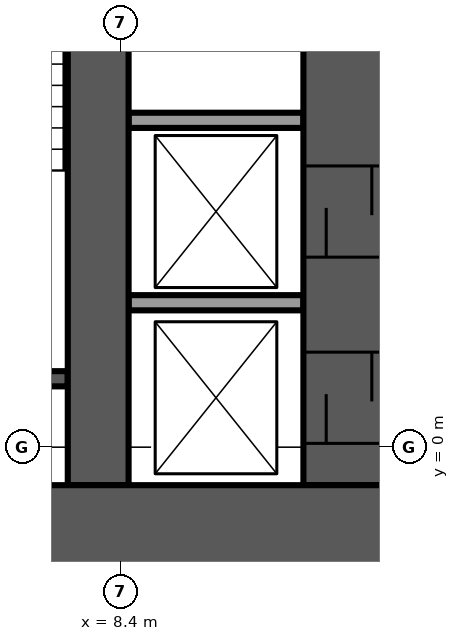
"""IFC4 building model, lengths in metres.
Left out: names, types, materials, properties, quantities, classifications, styles, units other than length and angle.
Written with IfcOpenShell. Run it as: python <this file> out.ifc"""

import sys

from ifc_helpers import new_model, si_unit, direction, frame, frame_2d, origin, place, context, subcontext, project, spatial, rectangle, extrude, element, fill, save


model = new_model("IFC4")
c1 = context("Model", 3, precision=1e-05, world=origin(), true_north=direction((0.0, 1.0)))
c2 = subcontext(c1, "Body", "Model", "MODEL_VIEW")
j1 = project(units=[si_unit("LENGTHUNIT", "METRE"), si_unit("PLANEANGLEUNIT", "RADIAN")], contexts=[c1])
p1 = place(None, origin())
s1 = spatial("IfcSite", under=j1, at=p1, CompositionType="ELEMENT")
p2 = place(p1, origin())
s2 = spatial("IfcBuilding", under=s1, at=p2, CompositionType="ELEMENT")
p3 = place(p2, frame((0.0, 0.0, 14.5)))
s3 = spatial("IfcBuildingStorey", under=s2, at=p3, CompositionType="ELEMENT", Elevation=14.5)
p4 = place(p3, frame((-12.0, -1.1, -0.3), z_axis=(0.0, 0.0, 1.0), x_axis=(1.0, 0.0, 0.0)))
e1 = element("IfcWall", 1, at=p4, inside=s3, PredefinedType="SHEAR", context=c2, shape_type="SweptSolid", body=[
    extrude(rectangle(XDim=24.0, YDim=1.2, at=frame_2d((12.0, 0.0))), origin(), (0.0, 0.0, 1.0), 4.5),
])
p5 = place(p4, frame((11.2, 0.0, 0.0)))
e2 = element("IfcOpeningElement", 2, at=p5, cuts=e1, PredefinedType="OPENING", context=c2, shape_type="SweptSolid", body=[
    extrude(rectangle(XDim=1.6, YDim=2.1, at=frame_2d((0.8, 1.05))), frame((0.0, 0.6, 0.0), z_axis=(0.0, -1.0, 0.0), x_axis=(1.0, 0.0, 0.0)), (0.0, 0.0, 1.0), 1.2),
])
p6 = place(p3, frame((8.1, -0.5, -0.3), z_axis=(0.0, 0.0, 1.0), x_axis=(0.0, 1.0, 0.0)))
e3 = element("IfcWall", 3, at=p6, inside=s3, PredefinedType="SHEAR", context=c2, shape_type="SweptSolid", body=[
    extrude(rectangle(XDim=9.0, YDim=0.8, at=frame_2d((4.5, 0.0))), origin(), (0.0, 0.0, 1.0), 4.5),
])
p7 = place(p6, frame((7.75, 0.0, 0.0)))
e4 = element("IfcOpeningElement", 4, at=p7, cuts=e3, PredefinedType="OPENING", context=c2, shape_type="SweptSolid", body=[
    extrude(rectangle(XDim=1.1, YDim=2.1, at=frame_2d((0.55, 1.05))), frame((0.0, 0.4, 0.0), z_axis=(0.0, -1.0, 0.0), x_axis=(1.0, 0.0, 0.0)), (0.0, 0.0, 1.0), 0.8),
])
p8 = place(p3, frame((11.4, -0.5, -0.3), z_axis=(0.0, 0.0, 1.0), x_axis=(0.0, 1.0, 0.0)))
e5 = element("IfcWall", 5, at=p8, inside=s3, PredefinedType="SHEAR", context=c2, shape_type="SweptSolid", body=[
    extrude(rectangle(XDim=9.0, YDim=1.2, at=frame_2d((4.5, 0.0))), origin(), (0.0, 0.0, 1.0), 4.5),
])
p9 = place(p8, frame((7.75, 0.0, 0.0)))
e6 = element("IfcOpeningElement", 6, at=p9, cuts=e5, PredefinedType="OPENING", context=c2, shape_type="SweptSolid", body=[
    extrude(rectangle(XDim=1.1, YDim=2.1, at=frame_2d((0.55, 1.05))), frame((0.0, 0.6, 0.0), z_axis=(0.0, -1.0, 0.0), x_axis=(1.0, 0.0, 0.0)), (0.0, 0.0, 1.0), 1.2),
])
p10 = place(p8, frame((0.55, 0.0, 0.0)))
e7 = element("IfcOpeningElement", 7, at=p10, cuts=e5, PredefinedType="OPENING", context=c2, shape_type="SweptSolid", body=[
    extrude(rectangle(XDim=1.2, YDim=2.1, at=frame_2d((0.6, 1.05))), frame((0.0, 0.6, 0.0), z_axis=(0.0, -1.0, 0.0), x_axis=(1.0, 0.0, 0.0)), (0.0, 0.0, 1.0), 1.2),
])
p11 = place(p8, frame((3.0, 0.0, 0.0)))
e8 = element("IfcOpeningElement", 8, at=p11, cuts=e5, PredefinedType="OPENING", context=c2, shape_type="SweptSolid", body=[
    extrude(rectangle(XDim=1.2, YDim=2.1, at=frame_2d((0.6, 1.05))), frame((0.0, 0.6, 0.0), z_axis=(0.0, -1.0, 0.0), x_axis=(1.0, 0.0, 0.0)), (0.0, 0.0, 1.0), 1.2),
])
p12 = place(p3, frame((4.45, 0.9, -0.3), z_axis=(0.0, 0.0, 1.0), x_axis=(1.0, 0.0, 0.0)))
e9 = element("IfcWall", 9, at=p12, inside=s3, PredefinedType="SOLIDWALL", context=c2, shape_type="SweptSolid", body=[
    extrude(rectangle(XDim=3.25, YDim=0.2, at=frame_2d((1.625, 0.0))), origin(), (0.0, 0.0, 1.0), 4.5),
])
for number, where, z_axis, x_axis in (
    (10, (8.5, 1.9, 0.0), (0.0, 0.0, 1.0), (1.0, 0.0, 0.0)),
    (11, (8.5, 4.3, 0.0), (0.0, 0.0, 1.0), (1.0, 0.0, 0.0)),
):
    element("IfcWall", number, at=place(p3, frame(where, z_axis=z_axis, x_axis=x_axis)), inside=s3, PredefinedType="PARTITIONING", context=c2, shape_type="SweptSolid", body=[
        extrude(rectangle(XDim=2.3, YDim=0.2, at=frame_2d((1.15, 0.0))), origin(), (0.0, 0.0, 1.0), 4.2),
    ])
p13 = place(p10, origin())
e12 = element("IfcDoor", 12, at=p13, inside=s3, OperationType="SLIDING_TO_LEFT", PredefinedType="DOOR", context=c2, shape_type="SweptSolid", body=[
    extrude(rectangle(XDim=1.2, YDim=2.1, at=frame_2d((0.6, 1.05))), frame((0.0, 0.025, 0.0), z_axis=(0.0, -1.0, 0.0), x_axis=(1.0, 0.0, 0.0)), (0.0, 0.0, 1.0), 0.05),
])
fill(e7, e12)
p14 = place(p11, origin())
e13 = element("IfcDoor", 13, at=p14, inside=s3, OperationType="SLIDING_TO_LEFT", PredefinedType="DOOR", context=c2, shape_type="SweptSolid", body=[
    extrude(rectangle(XDim=1.2, YDim=2.1, at=frame_2d((0.6, 1.05))), frame((0.0, 0.025, 0.0), z_axis=(0.0, -1.0, 0.0), x_axis=(1.0, 0.0, 0.0)), (0.0, 0.0, 1.0), 0.05),
])
fill(e8, e13)
save(model, sys.argv[1])
